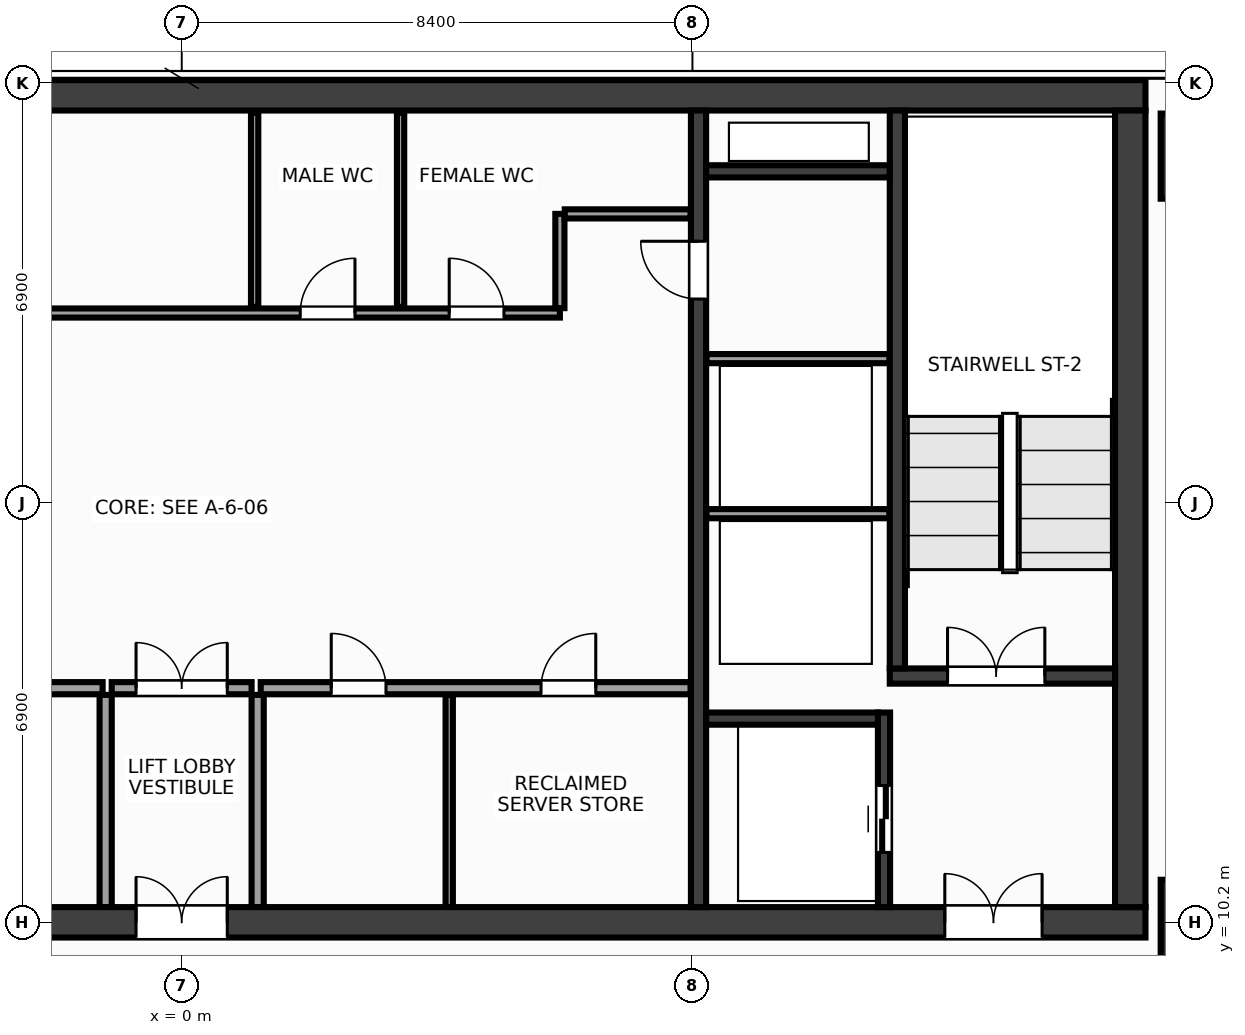
"""IFC4 building model, lengths in metres.
Left out: names, types, materials, properties, quantities, classifications, styles, units other than length and angle.
Written with IfcOpenShell. Run it as: python <this file> out.ifc"""

import sys

from ifc_helpers import new_model, si_unit, direction, frame, frame_2d, origin, origin_2d, place, context, subcontext, project, spatial, rectangle, extrude, source, transform, mapped, element, fill, save


model = new_model("IFC4")
c1 = context("Model", 3, precision=1e-05, world=origin(), true_north=direction((0.0, 1.0)))
c2 = subcontext(c1, "Body", "Model", "MODEL_VIEW")
j1 = project(units=[si_unit("LENGTHUNIT", "METRE"), si_unit("PLANEANGLEUNIT", "RADIAN")], contexts=[c1])
p1 = place(None, origin())
s1 = spatial("IfcSite", under=j1, at=p1, CompositionType="ELEMENT")
p2 = place(p1, origin())
s2 = spatial("IfcBuilding", under=s1, at=p2, CompositionType="ELEMENT")
p3 = place(p2, frame((0.0, 0.0, 246.8)))
s3 = spatial("IfcBuildingStorey", under=s2, at=p3, CompositionType="ELEMENT", Elevation=246.8)
m1 = source(origin(), c2, "Body", "SweptSolid", [
    extrude(rectangle(XDim=31.7, YDim=0.5, at=frame_2d((15.85, 0.0))), origin(), (0.0, 0.0, 1.0), 3.6),
])
p4 = place(p3, frame((-15.85, 23.8, 0.0), z_axis=(0.0, 0.0, 1.0), x_axis=(1.0, 0.0, 0.0)))
e1 = element("IfcWall", 1, at=p4, inside=s3, PredefinedType="SHEAR", context=c2, shape_type="MappedRepresentation", body=[
    mapped(m1, transform((0.0, 0.0, 0.0), x_axis=(1.0, 0.0, 0.0), y_axis=(0.0, 1.0, 0.0), z_axis=(0.0, 0.0, 1.0), scale=1.0)),
])
p5 = place(p3, frame((-15.85, 10.2, 0.0), z_axis=(0.0, 0.0, 1.0), x_axis=(1.0, 0.0, 0.0)))
e2 = element("IfcWall", 2, at=p5, inside=s3, PredefinedType="SHEAR", context=c2, shape_type="MappedRepresentation", body=[
    mapped(m1, transform((0.0, 0.0, 0.0), x_axis=(1.0, 0.0, 0.0), y_axis=(0.0, 1.0, 0.0), z_axis=(0.0, 0.0, 1.0), scale=1.0)),
])
p6 = place(p5, frame((1.7, 0.0, 0.0)))
e3 = element("IfcOpeningElement", 3, at=p6, cuts=e2, PredefinedType="OPENING", context=c2, shape_type="SweptSolid", body=[
    extrude(rectangle(XDim=1.6, YDim=2.15, at=frame_2d((0.8, 1.075))), frame((0.0, 0.262, 0.0), z_axis=(0.0, -1.0, 0.0), x_axis=(1.0, 0.0, 0.0)), (0.0, 0.0, 1.0), 0.524),
])
p7 = place(p5, frame((28.4, 0.0, 0.0)))
e4 = element("IfcOpeningElement", 4, at=p7, cuts=e2, PredefinedType="OPENING", context=c2, shape_type="SweptSolid", body=[
    extrude(rectangle(XDim=1.6, YDim=2.15, at=frame_2d((0.8, 1.075))), frame((0.0, 0.262, 0.0), z_axis=(0.0, -1.0, 0.0), x_axis=(1.0, 0.0, 0.0)), (0.0, 0.0, 1.0), 0.524),
])
p8 = place(p5, frame((15.1, 0.0, 0.0)))
e5 = element("IfcOpeningElement", 5, at=p8, cuts=e2, PredefinedType="OPENING", context=c2, shape_type="SweptSolid", body=[
    extrude(rectangle(XDim=1.5, YDim=2.2, at=frame_2d((0.75, 1.1))), frame((0.0, 0.262, 0.0), z_axis=(0.0, -1.0, 0.0), x_axis=(1.0, 0.0, 0.0)), (0.0, 0.0, 1.0), 0.524),
])
m2 = source(origin(), c2, "Body", "SweptSolid", [
    extrude(rectangle(XDim=13.1, YDim=0.5, at=frame_2d((6.55, 0.0))), origin(), (0.0, 0.0, 1.0), 3.6),
])
p9 = place(p3, frame((15.6, 10.45, 0.0), z_axis=(0.0, 0.0, 1.0), x_axis=(0.0, 1.0, 0.0)))
e6 = element("IfcWall", 6, at=p9, inside=s3, PredefinedType="SHEAR", context=c2, shape_type="MappedRepresentation", body=[
    mapped(m2, transform((0.0, 0.0, 0.0), x_axis=(1.0, 0.0, 0.0), y_axis=(0.0, 1.0, 0.0), z_axis=(0.0, 0.0, 1.0), scale=1.0)),
])
m3 = source(origin(), c2, "Body", "SweptSolid", [
    extrude(rectangle(XDim=13.1, YDim=0.25, at=frame_2d((6.55, 0.0))), origin(), (0.0, 0.0, 1.0), 3.6),
])
p10 = place(p3, frame((8.5, 10.45, 0.0), z_axis=(0.0, 0.0, 1.0), x_axis=(0.0, 1.0, 0.0)))
e7 = element("IfcWall", 7, at=p10, inside=s3, PredefinedType="SHEAR", context=c2, shape_type="MappedRepresentation", body=[
    mapped(m3, transform((0.0, 0.0, 0.0), x_axis=(1.0, 0.0, 0.0), y_axis=(0.0, 1.0, 0.0), z_axis=(0.0, 0.0, 1.0), scale=1.0)),
])
p11 = place(p10, frame((10.0, 0.0, 0.0)))
e8 = element("IfcOpeningElement", 8, at=p11, cuts=e7, PredefinedType="OPENING", context=c2, shape_type="SweptSolid", body=[
    extrude(rectangle(XDim=0.95, YDim=2.15, at=frame_2d((0.475, 1.075))), frame((0.0, 0.137, 0.0), z_axis=(0.0, -1.0, 0.0), x_axis=(1.0, 0.0, 0.0)), (0.0, 0.0, 1.0), 0.274),
])
m4 = source(origin(), c2, "Body", "SweptSolid", [
    extrude(rectangle(XDim=3.705, YDim=0.25, at=frame_2d((1.853, 0.0))), origin(), (0.0, 0.0, 1.0), 3.6),
])
p12 = place(p3, frame((11.645, 14.25, 0.0), z_axis=(0.0, 0.0, 1.0), x_axis=(1.0, 0.0, 0.0)))
e9 = element("IfcWall", 9, at=p12, inside=s3, PredefinedType="SHEAR", context=c2, shape_type="MappedRepresentation", body=[
    mapped(m4, transform((0.0, 0.0, 0.0), x_axis=(1.0, 0.0, 0.0), y_axis=(0.0, 1.0, 0.0), z_axis=(0.0, 0.0, 1.0), scale=1.0)),
])
p13 = place(p12, frame((0.95, 0.0, 0.0)))
e10 = element("IfcOpeningElement", 10, at=p13, cuts=e9, PredefinedType="OPENING", context=c2, shape_type="SweptSolid", body=[
    extrude(rectangle(XDim=1.6, YDim=2.15, at=frame_2d((0.8, 1.075))), frame((0.0, 0.137, 0.0), z_axis=(0.0, -1.0, 0.0), x_axis=(1.0, 0.0, 0.0)), (0.0, 0.0, 1.0), 0.274),
])
m5 = source(origin(), c2, "Body", "SweptSolid", [
    extrude(rectangle(XDim=9.175, YDim=0.25, at=frame_2d((4.587, 0.0))), origin(), (0.0, 0.0, 1.0), 3.6),
])
p14 = place(p3, frame((11.77, 14.375, 0.0), z_axis=(0.0, 0.0, 1.0), x_axis=(0.0, 1.0, 0.0)))
e11 = element("IfcWall", 11, at=p14, inside=s3, PredefinedType="SHEAR", context=c2, shape_type="MappedRepresentation", body=[
    mapped(m5, transform((0.0, 0.0, 0.0), x_axis=(1.0, 0.0, 0.0), y_axis=(0.0, 1.0, 0.0), z_axis=(0.0, 0.0, 1.0), scale=1.0)),
])
m6 = source(origin(), c2, "Body", "SweptSolid", [
    extrude(rectangle(XDim=3.2, YDim=0.2, at=frame_2d((1.6, 0.0))), origin(), (0.0, 0.0, 1.0), 3.6),
])
p15 = place(p3, frame((11.55, 10.45, 0.0), z_axis=(0.0, 0.0, 1.0), x_axis=(0.0, 1.0, 0.0)))
e12 = element("IfcWall", 12, at=p15, inside=s3, PredefinedType="SHEAR", context=c2, shape_type="MappedRepresentation", body=[
    mapped(m6, transform((0.0, 0.0, 0.0), x_axis=(1.0, 0.0, 0.0), y_axis=(0.0, 1.0, 0.0), z_axis=(0.0, 0.0, 1.0), scale=1.0)),
])
p16 = place(p15, frame((0.9, 0.0, 0.0)))
e13 = element("IfcOpeningElement", 13, at=p16, cuts=e12, PredefinedType="OPENING", context=c2, shape_type="SweptSolid", body=[
    extrude(rectangle(XDim=1.1, YDim=2.15, at=frame_2d((0.55, 1.075))), frame((0.0, 0.112, 0.0), z_axis=(0.0, -1.0, 0.0), x_axis=(1.0, 0.0, 0.0)), (0.0, 0.0, 1.0), 0.224),
])
m7 = source(origin(), c2, "Body", "SweptSolid", [
    extrude(rectangle(XDim=2.825, YDim=0.2, at=frame_2d((1.413, 0.0))), origin(), (0.0, 0.0, 1.0), 3.6),
])
p17 = place(p3, frame((8.625, 13.55, 0.0), z_axis=(0.0, 0.0, 1.0), x_axis=(1.0, 0.0, 0.0)))
e14 = element("IfcWall", 14, at=p17, inside=s3, PredefinedType="SHEAR", context=c2, shape_type="MappedRepresentation", body=[
    mapped(m7, transform((0.0, 0.0, 0.0), x_axis=(1.0, 0.0, 0.0), y_axis=(0.0, 1.0, 0.0), z_axis=(0.0, 0.0, 1.0), scale=1.0)),
])
m8 = source(origin(), c2, "Body", "SweptSolid", [
    extrude(rectangle(XDim=3.02, YDim=0.2, at=frame_2d((1.51, 0.0))), origin(), (0.0, 0.0, 1.0), 3.6),
])
p18 = place(p3, frame((8.625, 22.55, 0.0), z_axis=(0.0, 0.0, 1.0), x_axis=(1.0, 0.0, 0.0)))
e15 = element("IfcWall", 15, at=p18, inside=s3, PredefinedType="SHEAR", context=c2, shape_type="MappedRepresentation", body=[
    mapped(m8, transform((0.0, 0.0, 0.0), x_axis=(1.0, 0.0, 0.0), y_axis=(0.0, 1.0, 0.0), z_axis=(0.0, 0.0, 1.0), scale=1.0)),
])
m9 = source(origin(), c2, "Body", "SweptSolid", [
    extrude(rectangle(XDim=1.4, YDim=1.4, at=origin_2d()), origin(), (0.0, 0.0, 1.0), 3.6),
])
for number, where, z_axis, x_axis in (
    (16, (16.8, 10.2, 0.0), (0.0, 0.0, 1.0), (1.0, 0.0, 0.0)),
    (17, (16.8, 22.8, 0.0), (0.0, 0.0, 1.0), (1.0, 0.0, 0.0)),
):
    element("IfcColumn", number, at=place(p3, frame(where, z_axis=z_axis, x_axis=x_axis)), inside=s3, PredefinedType="COLUMN", context=c2, shape_type="MappedRepresentation", body=[
        mapped(m9, transform((0.0, 0.0, 0.0), x_axis=(1.0, 0.0, 0.0), y_axis=(0.0, 1.0, 0.0), z_axis=(0.0, 0.0, 1.0), scale=1.0)),
    ])
m10 = source(origin(), c2, "Body", "SweptSolid", [
    extrude(rectangle(XDim=3.01, YDim=0.15, at=frame_2d((1.505, 0.0))), origin(), (0.0, 0.0, 1.0), 3.37),
])
for number, where, z_axis, x_axis in (
    (18, (8.63, 16.92, 0.0), (0.0, 0.0, 1.0), (1.0, 0.0, 0.0)),
    (19, (8.63, 19.47, 0.0), (0.0, 0.0, 1.0), (1.0, 0.0, 0.0)),
):
    element("IfcWall", number, at=place(p3, frame(where, z_axis=z_axis, x_axis=x_axis)), inside=s3, PredefinedType="PARTITIONING", context=c2, shape_type="MappedRepresentation", body=[
        mapped(m10, transform((0.0, 0.0, 0.0), x_axis=(1.0, 0.0, 0.0), y_axis=(0.0, 1.0, 0.0), z_axis=(0.0, 0.0, 1.0), scale=1.0)),
    ])
m11 = source(origin(), c2, "Body", "SweptSolid", [
    extrude(rectangle(XDim=7.07, YDim=0.2, at=frame_2d((3.535, 0.0))), origin(), (0.0, 0.0, 1.0), 3.37),
])
p19 = place(p3, frame((-8.37, 14.05, 0.0), z_axis=(0.0, 0.0, 1.0), x_axis=(1.0, 0.0, 0.0)))
e20 = element("IfcWall", 20, at=p19, inside=s3, PredefinedType="PARTITIONING", context=c2, shape_type="MappedRepresentation", body=[
    mapped(m11, transform((0.0, 0.0, 0.0), x_axis=(1.0, 0.0, 0.0), y_axis=(0.0, 1.0, 0.0), z_axis=(0.0, 0.0, 1.0), scale=1.0)),
])
p20 = place(p19, frame((2.8, 0.0, 0.0)))
e21 = element("IfcOpeningElement", 21, at=p20, cuts=e20, PredefinedType="OPENING", context=c2, shape_type="SweptSolid", body=[
    extrude(rectangle(XDim=0.98, YDim=2.15, at=frame_2d((0.49, 1.075))), frame((0.0, 0.112, 0.0), z_axis=(0.0, -1.0, 0.0), x_axis=(1.0, 0.0, 0.0)), (0.0, 0.0, 1.0), 0.224),
])
p21 = place(p3, frame((1.3, 14.05, 0.0), z_axis=(0.0, 0.0, 1.0), x_axis=(1.0, 0.0, 0.0)))
e22 = element("IfcWall", 22, at=p21, inside=s3, PredefinedType="PARTITIONING", context=c2, shape_type="MappedRepresentation", body=[
    mapped(m11, transform((0.0, 0.0, 0.0), x_axis=(1.0, 0.0, 0.0), y_axis=(0.0, 1.0, 0.0), z_axis=(0.0, 0.0, 1.0), scale=1.0)),
])
p22 = place(p21, frame((1.16, 0.0, 0.0)))
e23 = element("IfcOpeningElement", 23, at=p22, cuts=e22, PredefinedType="OPENING", context=c2, shape_type="SweptSolid", body=[
    extrude(rectangle(XDim=0.9, YDim=2.15, at=frame_2d((0.45, 1.075))), frame((0.0, 0.112, 0.0), z_axis=(0.0, -1.0, 0.0), x_axis=(1.0, 0.0, 0.0)), (0.0, 0.0, 1.0), 0.224),
])
p23 = place(p21, frame((4.61, 0.0, 0.0)))
e24 = element("IfcOpeningElement", 24, at=p23, cuts=e22, PredefinedType="OPENING", context=c2, shape_type="SweptSolid", body=[
    extrude(rectangle(XDim=0.9, YDim=2.15, at=frame_2d((0.45, 1.075))), frame((0.0, 0.112, 0.0), z_axis=(0.0, -1.0, 0.0), x_axis=(1.0, 0.0, 0.0)), (0.0, 0.0, 1.0), 0.224),
])
m12 = source(origin(), c2, "Body", "SweptSolid", [
    extrude(rectangle(XDim=3.49, YDim=0.2, at=frame_2d((1.745, 0.0))), origin(), (0.0, 0.0, 1.0), 3.37),
])
for number, where, z_axis, x_axis in (
    (25, (-1.25, 10.45, 0.0), (0.0, 0.0, 1.0), (0.0, 1.0, 0.0)),
    (26, (1.25, 10.45, 0.0), (0.0, 0.0, 1.0), (0.0, 1.0, 0.0)),
):
    element("IfcWall", number, at=place(p3, frame(where, z_axis=z_axis, x_axis=x_axis)), inside=s3, PredefinedType="PARTITIONING", context=c2, shape_type="MappedRepresentation", body=[
        mapped(m12, transform((0.0, 0.0, 0.0), x_axis=(1.0, 0.0, 0.0), y_axis=(0.0, 1.0, 0.0), z_axis=(0.0, 0.0, 1.0), scale=1.0)),
    ])
m13 = source(origin(), c2, "Body", "SweptSolid", [
    extrude(rectangle(XDim=2.3, YDim=0.2, at=frame_2d((1.15, 0.0))), origin(), (0.0, 0.0, 1.0), 3.37),
])
p24 = place(p3, frame((-1.15, 14.05, 0.0), z_axis=(0.0, 0.0, 1.0), x_axis=(1.0, 0.0, 0.0)))
e27 = element("IfcWall", 27, at=p24, inside=s3, PredefinedType="PARTITIONING", context=c2, shape_type="MappedRepresentation", body=[
    mapped(m13, transform((0.0, 0.0, 0.0), x_axis=(1.0, 0.0, 0.0), y_axis=(0.0, 1.0, 0.0), z_axis=(0.0, 0.0, 1.0), scale=1.0)),
])
p25 = place(p24, frame((0.4, 0.0, 0.0)))
e28 = element("IfcOpeningElement", 28, at=p25, cuts=e27, PredefinedType="OPENING", context=c2, shape_type="SweptSolid", body=[
    extrude(rectangle(XDim=1.5, YDim=2.2, at=frame_2d((0.75, 1.1))), frame((0.0, 0.112, 0.0), z_axis=(0.0, -1.0, 0.0), x_axis=(1.0, 0.0, 0.0)), (0.0, 0.0, 1.0), 0.224),
])
m14 = source(origin(), c2, "Body", "SweptSolid", [
    extrude(rectangle(XDim=14.59, YDim=0.15, at=frame_2d((7.295, 0.0))), origin(), (0.0, 0.0, 1.0), 3.37),
])
p26 = place(p3, frame((-8.37, 20.22, 0.0), z_axis=(0.0, 0.0, 1.0), x_axis=(1.0, 0.0, 0.0)))
e29 = element("IfcWall", 29, at=p26, inside=s3, PredefinedType="PARTITIONING", context=c2, shape_type="MappedRepresentation", body=[
    mapped(m14, transform((0.0, 0.0, 0.0), x_axis=(1.0, 0.0, 0.0), y_axis=(0.0, 1.0, 0.0), z_axis=(0.0, 0.0, 1.0), scale=1.0)),
])
p27 = place(p26, frame((4.36, 0.0, 0.0)))
e30 = element("IfcOpeningElement", 30, at=p27, cuts=e29, PredefinedType="OPENING", context=c2, shape_type="SweptSolid", body=[
    extrude(rectangle(XDim=0.9, YDim=2.15, at=frame_2d((0.45, 1.075))), frame((0.0, 0.087, 0.0), z_axis=(0.0, -1.0, 0.0), x_axis=(1.0, 0.0, 0.0)), (0.0, 0.0, 1.0), 0.174),
])
p28 = place(p26, frame((10.32, 0.0, 0.0)))
e31 = element("IfcOpeningElement", 31, at=p28, cuts=e29, PredefinedType="OPENING", context=c2, shape_type="SweptSolid", body=[
    extrude(rectangle(XDim=0.9, YDim=2.15, at=frame_2d((0.45, 1.075))), frame((0.0, 0.087, 0.0), z_axis=(0.0, -1.0, 0.0), x_axis=(1.0, 0.0, 0.0)), (0.0, 0.0, 1.0), 0.174),
])
p29 = place(p26, frame((12.77, 0.0, 0.0)))
e32 = element("IfcOpeningElement", 32, at=p29, cuts=e29, PredefinedType="OPENING", context=c2, shape_type="SweptSolid", body=[
    extrude(rectangle(XDim=0.9, YDim=2.15, at=frame_2d((0.45, 1.075))), frame((0.0, 0.087, 0.0), z_axis=(0.0, -1.0, 0.0), x_axis=(1.0, 0.0, 0.0)), (0.0, 0.0, 1.0), 0.174),
])
m15 = source(origin(), c2, "Body", "SweptSolid", [
    extrude(rectangle(XDim=1.55, YDim=0.15, at=frame_2d((0.775, 0.0))), origin(), (0.0, 0.0, 1.0), 3.37),
])
p30 = place(p3, frame((6.22, 20.3, 0.0), z_axis=(0.0, 0.0, 1.0), x_axis=(0.0, 1.0, 0.0)))
e33 = element("IfcWall", 33, at=p30, inside=s3, PredefinedType="PARTITIONING", context=c2, shape_type="MappedRepresentation", body=[
    mapped(m15, transform((0.0, 0.0, 0.0), x_axis=(1.0, 0.0, 0.0), y_axis=(0.0, 1.0, 0.0), z_axis=(0.0, 0.0, 1.0), scale=1.0)),
])
m16 = source(origin(), c2, "Body", "SweptSolid", [
    extrude(rectangle(XDim=2.07, YDim=0.15, at=frame_2d((1.035, 0.0))), origin(), (0.0, 0.0, 1.0), 3.37),
])
p31 = place(p3, frame((6.3, 21.85, 0.0), z_axis=(0.0, 0.0, 1.0), x_axis=(1.0, 0.0, 0.0)))
e34 = element("IfcWall", 34, at=p31, inside=s3, PredefinedType="PARTITIONING", context=c2, shape_type="MappedRepresentation", body=[
    mapped(m16, transform((0.0, 0.0, 0.0), x_axis=(1.0, 0.0, 0.0), y_axis=(0.0, 1.0, 0.0), z_axis=(0.0, 0.0, 1.0), scale=1.0)),
])
m17 = source(origin(), c2, "Body", "SweptSolid", [
    extrude(rectangle(XDim=3.49, YDim=0.12, at=frame_2d((1.745, 0.0))), origin(), (0.0, 0.0, 1.0), 3.37),
])
p32 = place(p3, frame((4.4, 10.45, 0.0), z_axis=(0.0, 0.0, 1.0), x_axis=(0.0, 1.0, 0.0)))
e35 = element("IfcWall", 35, at=p32, inside=s3, PredefinedType="PARTITIONING", context=c2, shape_type="MappedRepresentation", body=[
    mapped(m17, transform((0.0, 0.0, 0.0), x_axis=(1.0, 0.0, 0.0), y_axis=(0.0, 1.0, 0.0), z_axis=(0.0, 0.0, 1.0), scale=1.0)),
])
m18 = source(origin(), c2, "Body", "SweptSolid", [
    extrude(rectangle(XDim=3.19, YDim=0.12, at=frame_2d((1.595, 0.0))), origin(), (0.0, 0.0, 1.0), 3.37),
])
for number, where, z_axis, x_axis in (
    (36, (1.2, 20.32, 0.0), (0.0, 0.0, 1.0), (0.0, 1.0, 0.0)),
    (37, (3.6, 20.32, 0.0), (0.0, 0.0, 1.0), (0.0, 1.0, 0.0)),
):
    element("IfcWall", number, at=place(p3, frame(where, z_axis=z_axis, x_axis=x_axis)), inside=s3, PredefinedType="PARTITIONING", context=c2, shape_type="MappedRepresentation", body=[
        mapped(m18, transform((0.0, 0.0, 0.0), x_axis=(1.0, 0.0, 0.0), y_axis=(0.0, 1.0, 0.0), z_axis=(0.0, 0.0, 1.0), scale=1.0)),
    ])
m19 = source(origin(), c2, "Body", "SweptSolid", [
    extrude(rectangle(XDim=1.6, YDim=2.15, at=frame_2d((0.8, 1.075))), frame((0.0, 0.025, 0.0), z_axis=(0.0, -1.0, 0.0), x_axis=(1.0, 0.0, 0.0)), (0.0, 0.0, 1.0), 0.05),
])
p33 = place(p13, origin())
e38 = element("IfcDoor", 38, at=p33, inside=s3, OperationType="DOUBLE_DOOR_SINGLE_SWING", PredefinedType="DOOR", context=c2, shape_type="MappedRepresentation", body=[
    mapped(m19, transform((0.0, 0.0, 0.0), x_axis=(1.0, 0.0, 0.0), y_axis=(0.0, 1.0, 0.0), z_axis=(0.0, 0.0, 1.0), scale=1.0)),
])
fill(e10, e38)
p34 = place(p7, origin())
e39 = element("IfcDoor", 39, at=p34, inside=s3, OperationType="DOUBLE_DOOR_SINGLE_SWING", PredefinedType="DOOR", context=c2, shape_type="MappedRepresentation", body=[
    mapped(m19, transform((0.0, 0.0, 0.0), x_axis=(1.0, 0.0, 0.0), y_axis=(0.0, 1.0, 0.0), z_axis=(0.0, 0.0, 1.0), scale=1.0)),
])
fill(e4, e39)
m20 = source(origin(), c2, "Body", "SweptSolid", [
    extrude(rectangle(XDim=1.1, YDim=2.15, at=frame_2d((0.55, 1.075))), frame((0.0, 0.025, 0.0), z_axis=(0.0, -1.0, 0.0), x_axis=(1.0, 0.0, 0.0)), (0.0, 0.0, 1.0), 0.05),
])
p35 = place(p16, origin())
e40 = element("IfcDoor", 40, at=p35, inside=s3, OperationType="DOUBLE_DOOR_SLIDING", PredefinedType="DOOR", context=c2, shape_type="MappedRepresentation", body=[
    mapped(m20, transform((0.0, 0.0, 0.0), x_axis=(1.0, 0.0, 0.0), y_axis=(0.0, 1.0, 0.0), z_axis=(0.0, 0.0, 1.0), scale=1.0)),
])
fill(e13, e40)
m21 = source(origin(), c2, "Body", "SweptSolid", [
    extrude(rectangle(XDim=0.95, YDim=2.15, at=frame_2d((0.475, 1.075))), frame((0.0, 0.025, 0.0), z_axis=(0.0, -1.0, 0.0), x_axis=(1.0, 0.0, 0.0)), (0.0, 0.0, 1.0), 0.05),
])
p36 = place(p11, origin())
e41 = element("IfcDoor", 41, at=p36, inside=s3, OperationType="SINGLE_SWING_RIGHT", PredefinedType="DOOR", context=c2, shape_type="MappedRepresentation", body=[
    mapped(m21, transform((0.0, 0.0, 0.0), x_axis=(1.0, 0.0, 0.0), y_axis=(0.0, 1.0, 0.0), z_axis=(0.0, 0.0, 1.0), scale=1.0)),
])
fill(e8, e41)
m22 = source(origin(), c2, "Body", "SweptSolid", [
    extrude(rectangle(XDim=0.9, YDim=2.15, at=frame_2d((0.45, 1.075))), frame((0.0, 0.025, 0.0), z_axis=(0.0, -1.0, 0.0), x_axis=(1.0, 0.0, 0.0)), (0.0, 0.0, 1.0), 0.05),
])
p37 = place(p22, origin())
e42 = element("IfcDoor", 42, at=p37, inside=s3, OperationType="SINGLE_SWING_LEFT", PredefinedType="DOOR", context=c2, shape_type="MappedRepresentation", body=[
    mapped(m22, transform((0.0, 0.0, 0.0), x_axis=(1.0, 0.0, 0.0), y_axis=(0.0, 1.0, 0.0), z_axis=(0.0, 0.0, 1.0), scale=1.0)),
])
fill(e23, e42)
p38 = place(p23, origin())
e43 = element("IfcDoor", 43, at=p38, inside=s3, OperationType="SINGLE_SWING_RIGHT", PredefinedType="DOOR", context=c2, shape_type="MappedRepresentation", body=[
    mapped(m22, transform((0.0, 0.0, 0.0), x_axis=(1.0, 0.0, 0.0), y_axis=(0.0, 1.0, 0.0), z_axis=(0.0, 0.0, 1.0), scale=1.0)),
])
fill(e24, e43)
m23 = source(origin(), c2, "Body", "SweptSolid", [
    extrude(rectangle(XDim=1.5, YDim=2.2, at=frame_2d((0.75, 1.1))), frame((0.0, 0.025, 0.0), z_axis=(0.0, -1.0, 0.0), x_axis=(1.0, 0.0, 0.0)), (0.0, 0.0, 1.0), 0.05),
])
p39 = place(p25, origin())
e44 = element("IfcDoor", 44, at=p39, inside=s3, OperationType="DOUBLE_DOOR_SINGLE_SWING", PredefinedType="DOOR", context=c2, shape_type="MappedRepresentation", body=[
    mapped(m23, transform((0.0, 0.0, 0.0), x_axis=(1.0, 0.0, 0.0), y_axis=(0.0, 1.0, 0.0), z_axis=(0.0, 0.0, 1.0), scale=1.0)),
])
fill(e28, e44)
p40 = place(p8, origin())
e45 = element("IfcDoor", 45, at=p40, inside=s3, OperationType="DOUBLE_DOOR_SINGLE_SWING", PredefinedType="DOOR", context=c2, shape_type="MappedRepresentation", body=[
    mapped(m23, transform((0.0, 0.0, 0.0), x_axis=(1.0, 0.0, 0.0), y_axis=(0.0, 1.0, 0.0), z_axis=(0.0, 0.0, 1.0), scale=1.0)),
])
fill(e5, e45)
p41 = place(p28, origin())
e46 = element("IfcDoor", 46, at=p41, inside=s3, OperationType="SINGLE_SWING_RIGHT", PredefinedType="DOOR", context=c2, shape_type="MappedRepresentation", body=[
    mapped(m22, transform((0.0, 0.0, 0.0), x_axis=(1.0, 0.0, 0.0), y_axis=(0.0, 1.0, 0.0), z_axis=(0.0, 0.0, 1.0), scale=1.0)),
])
fill(e31, e46)
p42 = place(p29, origin())
e47 = element("IfcDoor", 47, at=p42, inside=s3, OperationType="SINGLE_SWING_LEFT", PredefinedType="DOOR", context=c2, shape_type="MappedRepresentation", body=[
    mapped(m22, transform((0.0, 0.0, 0.0), x_axis=(1.0, 0.0, 0.0), y_axis=(0.0, 1.0, 0.0), z_axis=(0.0, 0.0, 1.0), scale=1.0)),
])
fill(e32, e47)
save(model, sys.argv[1])
